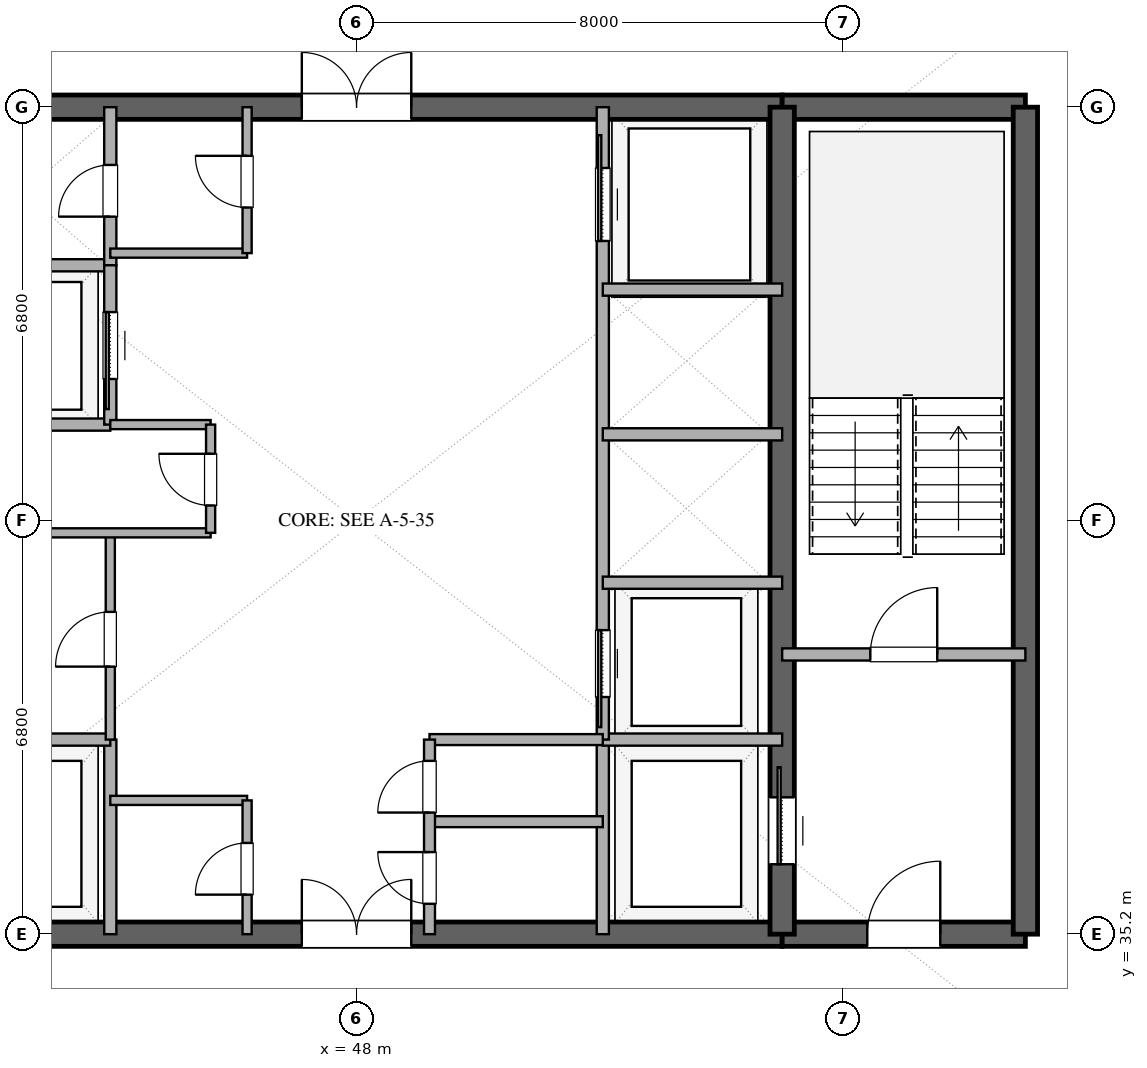
"""IFC4 building model, lengths in metres.
Left out: names, types, materials, properties, quantities, classifications, styles, units other than length and angle.
Written with IfcOpenShell. Run it as: python <this file> out.ifc"""

import sys

from ifc_helpers import new_model, si_unit, direction, frame, frame_2d, origin, place, context, subcontext, project, spatial, rectangle, extrude, element, fill, save


model = new_model("IFC4")
c1 = context("Model", 3, precision=1e-05, world=origin(), true_north=direction((0.0, 1.0)))
c2 = subcontext(c1, "Body", "Model", "MODEL_VIEW")
j1 = project(units=[si_unit("LENGTHUNIT", "METRE"), si_unit("PLANEANGLEUNIT", "RADIAN")], contexts=[c1])
p1 = place(None, origin())
s1 = spatial("IfcSite", under=j1, at=p1, CompositionType="ELEMENT")
p2 = place(p1, origin())
s2 = spatial("IfcBuilding", under=s1, at=p2, CompositionType="ELEMENT")
p3 = place(p2, frame((0.0, 0.0, 238.8)))
s3 = spatial("IfcBuildingStorey", under=s2, at=p3, CompositionType="ELEMENT", Elevation=238.8)
p4 = place(p3, frame((41.0, 35.2, 0.0), z_axis=(0.0, 0.0, 1.0), x_axis=(1.0, 0.0, 0.0)))
e1 = element("IfcWall", 1, at=p4, inside=s3, PredefinedType="SHEAR", context=c2, shape_type="SweptSolid", body=[
    extrude(rectangle(XDim=14.0, YDim=0.4, at=frame_2d((7.0, 0.0))), origin(), (0.0, 0.0, 1.0), 3.36),
])
p5 = place(p4, frame((6.1, 0.0, 0.0)))
e2 = element("IfcOpeningElement", 2, at=p5, cuts=e1, PredefinedType="OPENING", context=c2, shape_type="SweptSolid", body=[
    extrude(rectangle(XDim=1.8, YDim=2.25, at=frame_2d((0.9, 1.125))), frame((0.0, 0.21, 0.0), z_axis=(0.0, -1.0, 0.0), x_axis=(1.0, 0.0, 0.0)), (0.0, 0.0, 1.0), 0.42),
])
p6 = place(p3, frame((55.0, 35.2, 0.0), z_axis=(0.0, 0.0, 1.0), x_axis=(1.0, 0.0, 0.0)))
e3 = element("IfcWall", 3, at=p6, inside=s3, PredefinedType="SHEAR", context=c2, shape_type="SweptSolid", body=[
    extrude(rectangle(XDim=4.0, YDim=0.4, at=frame_2d((2.0, 0.0))), origin(), (0.0, 0.0, 1.0), 3.36),
])
p7 = place(p6, frame((1.4, 0.0, 0.0)))
e4 = element("IfcOpeningElement", 4, at=p7, cuts=e3, PredefinedType="OPENING", context=c2, shape_type="SweptSolid", body=[
    extrude(rectangle(XDim=1.2, YDim=2.15, at=frame_2d((0.6, 1.075))), frame((0.0, 0.21, 0.0), z_axis=(0.0, -1.0, 0.0), x_axis=(1.0, 0.0, 0.0)), (0.0, 0.0, 1.0), 0.42),
])
p8 = place(p3, frame((41.0, 48.8, 0.0), z_axis=(0.0, 0.0, 1.0), x_axis=(1.0, 0.0, 0.0)))
e5 = element("IfcWall", 5, at=p8, inside=s3, PredefinedType="SHEAR", context=c2, shape_type="SweptSolid", body=[
    extrude(rectangle(XDim=14.0, YDim=0.4, at=frame_2d((7.0, 0.0))), origin(), (0.0, 0.0, 1.0), 3.36),
])
p9 = place(p8, frame((6.1, 0.0, 0.0)))
e6 = element("IfcOpeningElement", 6, at=p9, cuts=e5, PredefinedType="OPENING", context=c2, shape_type="SweptSolid", body=[
    extrude(rectangle(XDim=1.8, YDim=2.25, at=frame_2d((0.9, 1.125))), frame((0.0, 0.21, 0.0), z_axis=(0.0, -1.0, 0.0), x_axis=(1.0, 0.0, 0.0)), (0.0, 0.0, 1.0), 0.42),
])
p10 = place(p3, frame((55.0, 48.8, 0.0), z_axis=(0.0, 0.0, 1.0), x_axis=(1.0, 0.0, 0.0)))
e7 = element("IfcWall", 7, at=p10, inside=s3, PredefinedType="SHEAR", context=c2, shape_type="SweptSolid", body=[
    extrude(rectangle(XDim=4.0, YDim=0.4, at=frame_2d((2.0, 0.0))), origin(), (0.0, 0.0, 1.0), 3.36),
])
p11 = place(p3, frame((59.0, 35.2, 0.0), z_axis=(0.0, 0.0, 1.0), x_axis=(0.0, 1.0, 0.0)))
e8 = element("IfcWall", 8, at=p11, inside=s3, PredefinedType="SHEAR", context=c2, shape_type="SweptSolid", body=[
    extrude(rectangle(XDim=13.6, YDim=0.4, at=frame_2d((6.8, 0.0))), origin(), (0.0, 0.0, 1.0), 3.36),
])
p12 = place(p3, frame((55.0, 35.2, 0.0), z_axis=(0.0, 0.0, 1.0), x_axis=(0.0, 1.0, 0.0)))
e9 = element("IfcWall", 9, at=p12, inside=s3, PredefinedType="SHEAR", context=c2, shape_type="SweptSolid", body=[
    extrude(rectangle(XDim=13.6, YDim=0.4, at=frame_2d((6.8, 0.0))), origin(), (0.0, 0.0, 1.0), 3.36),
])
p13 = place(p12, frame((1.15, 0.0, 0.0)))
e10 = element("IfcOpeningElement", 10, at=p13, cuts=e9, PredefinedType="OPENING", context=c2, shape_type="SweptSolid", body=[
    extrude(rectangle(XDim=1.1, YDim=2.2, at=frame_2d((0.55, 1.1))), frame((0.0, 0.21, 0.0), z_axis=(0.0, -1.0, 0.0), x_axis=(1.0, 0.0, 0.0)), (0.0, 0.0, 1.0), 0.42),
])
p14 = place(p3, frame((55.0, 39.8, 0.0), z_axis=(0.0, 0.0, 1.0), x_axis=(1.0, 0.0, 0.0)))
e11 = element("IfcWall", 11, at=p14, inside=s3, PredefinedType="SOLIDWALL", context=c2, shape_type="SweptSolid", body=[
    extrude(rectangle(XDim=4.0, YDim=0.2, at=frame_2d((2.0, 0.0))), origin(), (0.0, 0.0, 1.0), 2.72),
])
p15 = place(p14, frame((1.45, 0.0, 0.0)))
e12 = element("IfcOpeningElement", 12, at=p15, cuts=e11, PredefinedType="OPENING", context=c2, shape_type="SweptSolid", body=[
    extrude(rectangle(XDim=1.1, YDim=2.15, at=frame_2d((0.55, 1.075))), frame((0.0, 0.11, 0.0), z_axis=(0.0, -1.0, 0.0), x_axis=(1.0, 0.0, 0.0)), (0.0, 0.0, 1.0), 0.22),
])
p16 = place(p3, frame((43.95, 35.2, 0.0), z_axis=(0.0, 0.0, 1.0), x_axis=(0.0, 1.0, 0.0)))
e13 = element("IfcWall", 13, at=p16, inside=s3, PredefinedType="SOLIDWALL", context=c2, shape_type="SweptSolid", body=[
    extrude(rectangle(XDim=3.2, YDim=0.2, at=frame_2d((1.6, 0.0))), origin(), (0.0, 0.0, 1.0), 2.72),
])
p17 = place(p3, frame((41.0, 38.4, 0.0), z_axis=(0.0, 0.0, 1.0), x_axis=(1.0, 0.0, 0.0)))
e14 = element("IfcWall", 14, at=p17, inside=s3, PredefinedType="SOLIDWALL", context=c2, shape_type="SweptSolid", body=[
    extrude(rectangle(XDim=2.95, YDim=0.2, at=frame_2d((1.475, 0.0))), origin(), (0.0, 0.0, 1.0), 2.72),
])
p18 = place(p3, frame((52.05, 35.2, 0.0), z_axis=(0.0, 0.0, 1.0), x_axis=(0.0, 1.0, 0.0)))
e15 = element("IfcWall", 15, at=p18, inside=s3, PredefinedType="SOLIDWALL", context=c2, shape_type="SweptSolid", body=[
    extrude(rectangle(XDim=3.2, YDim=0.2, at=frame_2d((1.6, 0.0))), origin(), (0.0, 0.0, 1.0), 2.72),
])
for number, where, z_axis, x_axis in (
    (16, (52.05, 38.4, 0.0), (0.0, 0.0, 1.0), (1.0, 0.0, 0.0)),
    (17, (41.0, 46.2, 0.0), (0.0, 0.0, 1.0), (1.0, 0.0, 0.0)),
):
    element("IfcWall", number, at=place(p3, frame(where, z_axis=z_axis, x_axis=x_axis)), inside=s3, PredefinedType="SOLIDWALL", context=c2, shape_type="SweptSolid", body=[
        extrude(rectangle(XDim=2.95, YDim=0.2, at=frame_2d((1.475, 0.0))), origin(), (0.0, 0.0, 1.0), 2.72),
    ])
p19 = place(p3, frame((43.95, 46.2, 0.0), z_axis=(0.0, 0.0, 1.0), x_axis=(0.0, 1.0, 0.0)))
e18 = element("IfcWall", 18, at=p19, inside=s3, PredefinedType="SOLIDWALL", context=c2, shape_type="SweptSolid", body=[
    extrude(rectangle(XDim=2.6, YDim=0.2, at=frame_2d((1.3, 0.0))), origin(), (0.0, 0.0, 1.0), 2.72),
])
p20 = place(p19, frame((0.8, 0.0, 0.0)))
e19 = element("IfcOpeningElement", 19, at=p20, cuts=e18, PredefinedType="OPENING", context=c2, shape_type="SweptSolid", body=[
    extrude(rectangle(XDim=0.85, YDim=2.15, at=frame_2d((0.425, 1.075))), frame((0.0, 0.11, 0.0), z_axis=(0.0, -1.0, 0.0), x_axis=(1.0, 0.0, 0.0)), (0.0, 0.0, 1.0), 0.22),
])
p21 = place(p3, frame((41.0, 43.58, 0.0), z_axis=(0.0, 0.0, 1.0), x_axis=(1.0, 0.0, 0.0)))
e20 = element("IfcWall", 20, at=p21, inside=s3, PredefinedType="SOLIDWALL", context=c2, shape_type="SweptSolid", body=[
    extrude(rectangle(XDim=2.95, YDim=0.2, at=frame_2d((1.475, 0.0))), origin(), (0.0, 0.0, 1.0), 2.72),
])
p22 = place(p3, frame((43.95, 43.58, 0.0), z_axis=(0.0, 0.0, 1.0), x_axis=(0.0, 1.0, 0.0)))
e21 = element("IfcWall", 21, at=p22, inside=s3, PredefinedType="SOLIDWALL", context=c2, shape_type="SweptSolid", body=[
    extrude(rectangle(XDim=2.62, YDim=0.2, at=frame_2d((1.31, 0.0))), origin(), (0.0, 0.0, 1.0), 2.72),
])
p23 = place(p22, frame((0.75, 0.0, 0.0)))
e22 = element("IfcOpeningElement", 22, at=p23, cuts=e21, PredefinedType="OPENING", context=c2, shape_type="SweptSolid", body=[
    extrude(rectangle(XDim=1.1, YDim=2.2, at=frame_2d((0.55, 1.1))), frame((0.0, 0.11, 0.0), z_axis=(0.0, -1.0, 0.0), x_axis=(1.0, 0.0, 0.0)), (0.0, 0.0, 1.0), 0.22),
])
p24 = place(p3, frame((43.95, 38.4, 0.0), z_axis=(0.0, 0.0, 1.0), x_axis=(0.0, 1.0, 0.0)))
e23 = element("IfcWall", 23, at=p24, inside=s3, PredefinedType="PARTITIONING", context=c2, shape_type="SweptSolid", body=[
    extrude(rectangle(XDim=3.4, YDim=0.15, at=frame_2d((1.7, 0.0))), origin(), (0.0, 0.0, 1.0), 2.72),
])
p25 = place(p24, frame((1.2, 0.0, 0.0)))
e24 = element("IfcOpeningElement", 24, at=p25, cuts=e23, PredefinedType="OPENING", context=c2, shape_type="SweptSolid", body=[
    extrude(rectangle(XDim=0.9, YDim=2.15, at=frame_2d((0.45, 1.075))), frame((0.0, 0.085, 0.0), z_axis=(0.0, -1.0, 0.0), x_axis=(1.0, 0.0, 0.0)), (0.0, 0.0, 1.0), 0.17),
])
p26 = place(p3, frame((41.0, 41.8, 0.0), z_axis=(0.0, 0.0, 1.0), x_axis=(1.0, 0.0, 0.0)))
e25 = element("IfcWall", 25, at=p26, inside=s3, PredefinedType="PARTITIONING", context=c2, shape_type="SweptSolid", body=[
    extrude(rectangle(XDim=4.6, YDim=0.15, at=frame_2d((2.3, 0.0))), origin(), (0.0, 0.0, 1.0), 2.72),
])
p27 = place(p3, frame((43.95, 43.58, 0.0), z_axis=(0.0, 0.0, 1.0), x_axis=(1.0, 0.0, 0.0)))
e26 = element("IfcWall", 26, at=p27, inside=s3, PredefinedType="PARTITIONING", context=c2, shape_type="SweptSolid", body=[
    extrude(rectangle(XDim=1.65, YDim=0.15, at=frame_2d((0.825, 0.0))), origin(), (0.0, 0.0, 1.0), 2.72),
])
p28 = place(p3, frame((45.6, 41.8, 0.0), z_axis=(0.0, 0.0, 1.0), x_axis=(0.0, 1.0, 0.0)))
e27 = element("IfcWall", 27, at=p28, inside=s3, PredefinedType="PARTITIONING", context=c2, shape_type="SweptSolid", body=[
    extrude(rectangle(XDim=1.78, YDim=0.15, at=frame_2d((0.89, 0.0))), origin(), (0.0, 0.0, 1.0), 2.72),
])
p29 = place(p28, frame((0.45, 0.0, 0.0)))
e28 = element("IfcOpeningElement", 28, at=p29, cuts=e27, PredefinedType="OPENING", context=c2, shape_type="SweptSolid", body=[
    extrude(rectangle(XDim=0.85, YDim=2.15, at=frame_2d((0.425, 1.075))), frame((0.0, 0.085, 0.0), z_axis=(0.0, -1.0, 0.0), x_axis=(1.0, 0.0, 0.0)), (0.0, 0.0, 1.0), 0.17),
])
p30 = place(p3, frame((52.05, 38.4, 0.0), z_axis=(0.0, 0.0, 1.0), x_axis=(0.0, 1.0, 0.0)))
e29 = element("IfcWall", 29, at=p30, inside=s3, PredefinedType="SOLIDWALL", context=c2, shape_type="SweptSolid", body=[
    extrude(rectangle(XDim=10.4, YDim=0.2, at=frame_2d((5.2, 0.0))), origin(), (0.0, 0.0, 1.0), 2.72),
])
p31 = place(p30, frame((0.7, 0.0, 0.0)))
e30 = element("IfcOpeningElement", 30, at=p31, cuts=e29, PredefinedType="OPENING", context=c2, shape_type="SweptSolid", body=[
    extrude(rectangle(XDim=1.1, YDim=2.2, at=frame_2d((0.55, 1.1))), frame((0.0, 0.11, 0.0), z_axis=(0.0, -1.0, 0.0), x_axis=(1.0, 0.0, 0.0)), (0.0, 0.0, 1.0), 0.22),
])
p32 = place(p30, frame((8.2, 0.0, 0.0)))
e31 = element("IfcOpeningElement", 31, at=p32, cuts=e29, PredefinedType="OPENING", context=c2, shape_type="SweptSolid", body=[
    extrude(rectangle(XDim=1.2, YDim=2.2, at=frame_2d((0.6, 1.1))), frame((0.0, 0.11, 0.0), z_axis=(0.0, -1.0, 0.0), x_axis=(1.0, 0.0, 0.0)), (0.0, 0.0, 1.0), 0.22),
])
for number, where, z_axis, x_axis in (
    (32, (52.05, 40.98, 0.0), (0.0, 0.0, 1.0), (1.0, 0.0, 0.0)),
    (33, (52.05, 43.42, 0.0), (0.0, 0.0, 1.0), (1.0, 0.0, 0.0)),
    (34, (52.05, 45.8, 0.0), (0.0, 0.0, 1.0), (1.0, 0.0, 0.0)),
):
    element("IfcWall", number, at=place(p3, frame(where, z_axis=z_axis, x_axis=x_axis)), inside=s3, PredefinedType="SOLIDWALL", context=c2, shape_type="SweptSolid", body=[
        extrude(rectangle(XDim=2.95, YDim=0.2, at=frame_2d((1.475, 0.0))), origin(), (0.0, 0.0, 1.0), 2.72),
    ])
p33 = place(p3, frame((43.95, 37.4, 0.0), z_axis=(0.0, 0.0, 1.0), x_axis=(1.0, 0.0, 0.0)))
e35 = element("IfcWall", 35, at=p33, inside=s3, PredefinedType="PARTITIONING", context=c2, shape_type="SweptSolid", body=[
    extrude(rectangle(XDim=2.25, YDim=0.15, at=frame_2d((1.125, 0.0))), origin(), (0.0, 0.0, 1.0), 2.72),
])
p34 = place(p3, frame((46.2, 35.2, 0.0), z_axis=(0.0, 0.0, 1.0), x_axis=(0.0, 1.0, 0.0)))
e36 = element("IfcWall", 36, at=p34, inside=s3, PredefinedType="PARTITIONING", context=c2, shape_type="SweptSolid", body=[
    extrude(rectangle(XDim=2.2, YDim=0.15, at=frame_2d((1.1, 0.0))), origin(), (0.0, 0.0, 1.0), 2.72),
])
p35 = place(p34, frame((0.65, 0.0, 0.0)))
e37 = element("IfcOpeningElement", 37, at=p35, cuts=e36, PredefinedType="OPENING", context=c2, shape_type="SweptSolid", body=[
    extrude(rectangle(XDim=0.85, YDim=2.15, at=frame_2d((0.425, 1.075))), frame((0.0, 0.085, 0.0), z_axis=(0.0, -1.0, 0.0), x_axis=(1.0, 0.0, 0.0)), (0.0, 0.0, 1.0), 0.17),
])
p36 = place(p3, frame((43.95, 46.4, 0.0), z_axis=(0.0, 0.0, 1.0), x_axis=(1.0, 0.0, 0.0)))
e38 = element("IfcWall", 38, at=p36, inside=s3, PredefinedType="PARTITIONING", context=c2, shape_type="SweptSolid", body=[
    extrude(rectangle(XDim=2.25, YDim=0.15, at=frame_2d((1.125, 0.0))), origin(), (0.0, 0.0, 1.0), 2.72),
])
p37 = place(p3, frame((46.2, 46.4, 0.0), z_axis=(0.0, 0.0, 1.0), x_axis=(0.0, 1.0, 0.0)))
e39 = element("IfcWall", 39, at=p37, inside=s3, PredefinedType="PARTITIONING", context=c2, shape_type="SweptSolid", body=[
    extrude(rectangle(XDim=2.4, YDim=0.15, at=frame_2d((1.2, 0.0))), origin(), (0.0, 0.0, 1.0), 2.72),
])
p38 = place(p37, frame((0.75, 0.0, 0.0)))
e40 = element("IfcOpeningElement", 40, at=p38, cuts=e39, PredefinedType="OPENING", context=c2, shape_type="SweptSolid", body=[
    extrude(rectangle(XDim=0.85, YDim=2.15, at=frame_2d((0.425, 1.075))), frame((0.0, 0.085, 0.0), z_axis=(0.0, -1.0, 0.0), x_axis=(1.0, 0.0, 0.0)), (0.0, 0.0, 1.0), 0.17),
])
for number, where, z_axis, x_axis in (
    (41, (49.2, 37.05, 0.0), (0.0, 0.0, 1.0), (1.0, 0.0, 0.0)),
    (42, (49.2, 38.4, 0.0), (0.0, 0.0, 1.0), (1.0, 0.0, 0.0)),
):
    element("IfcWall", number, at=place(p3, frame(where, z_axis=z_axis, x_axis=x_axis)), inside=s3, PredefinedType="PLUMBINGWALL", context=c2, shape_type="SweptSolid", body=[
        extrude(rectangle(XDim=2.85, YDim=0.18, at=frame_2d((1.425, 0.0))), origin(), (0.0, 0.0, 1.0), 2.72),
    ])
p39 = place(p3, frame((49.2, 35.2, 0.0), z_axis=(0.0, 0.0, 1.0), x_axis=(0.0, 1.0, 0.0)))
e43 = element("IfcWall", 43, at=p39, inside=s3, PredefinedType="PLUMBINGWALL", context=c2, shape_type="SweptSolid", body=[
    extrude(rectangle(XDim=3.2, YDim=0.18, at=frame_2d((1.6, 0.0))), origin(), (0.0, 0.0, 1.0), 2.72),
])
p40 = place(p39, frame((0.5, 0.0, 0.0)))
e44 = element("IfcOpeningElement", 44, at=p40, cuts=e43, PredefinedType="OPENING", context=c2, shape_type="SweptSolid", body=[
    extrude(rectangle(XDim=0.85, YDim=2.1, at=frame_2d((0.425, 1.05))), frame((0.0, 0.1, 0.0), z_axis=(0.0, -1.0, 0.0), x_axis=(1.0, 0.0, 0.0)), (0.0, 0.0, 1.0), 0.2),
])
p41 = place(p39, frame((2.0, 0.0, 0.0)))
e45 = element("IfcOpeningElement", 45, at=p41, cuts=e43, PredefinedType="OPENING", context=c2, shape_type="SweptSolid", body=[
    extrude(rectangle(XDim=0.85, YDim=2.15, at=frame_2d((0.425, 1.075))), frame((0.0, 0.1, 0.0), z_axis=(0.0, -1.0, 0.0), x_axis=(1.0, 0.0, 0.0)), (0.0, 0.0, 1.0), 0.2),
])
p42 = place(p13, origin())
e46 = element("IfcDoor", 46, at=p42, inside=s3, OperationType="SLIDING_TO_RIGHT", PredefinedType="DOOR", context=c2, shape_type="SweptSolid", body=[
    extrude(rectangle(XDim=1.1, YDim=2.2, at=frame_2d((0.55, 1.1))), frame((0.0, 0.025, 0.0), z_axis=(0.0, -1.0, 0.0), x_axis=(1.0, 0.0, 0.0)), (0.0, 0.0, 1.0), 0.05),
])
fill(e10, e46)
p43 = place(p7, origin())
e47 = element("IfcDoor", 47, at=p43, inside=s3, OperationType="SINGLE_SWING_RIGHT", PredefinedType="DOOR", context=c2, shape_type="SweptSolid", body=[
    extrude(rectangle(XDim=1.2, YDim=2.15, at=frame_2d((0.6, 1.075))), frame((0.0, 0.025, 0.0), z_axis=(0.0, -1.0, 0.0), x_axis=(1.0, 0.0, 0.0)), (0.0, 0.0, 1.0), 0.05),
])
fill(e4, e47)
p44 = place(p5, origin())
e48 = element("IfcDoor", 48, at=p44, inside=s3, OperationType="DOUBLE_DOOR_SINGLE_SWING", PredefinedType="DOOR", context=c2, shape_type="SweptSolid", body=[
    extrude(rectangle(XDim=1.8, YDim=2.25, at=frame_2d((0.9, 1.125))), frame((0.0, 0.025, 0.0), z_axis=(0.0, -1.0, 0.0), x_axis=(1.0, 0.0, 0.0)), (0.0, 0.0, 1.0), 0.05),
])
fill(e2, e48)
p45 = place(p9, origin())
e49 = element("IfcDoor", 49, at=p45, inside=s3, OperationType="DOUBLE_DOOR_SINGLE_SWING", PredefinedType="DOOR", context=c2, shape_type="SweptSolid", body=[
    extrude(rectangle(XDim=1.8, YDim=2.25, at=frame_2d((0.9, 1.125))), frame((0.0, 0.025, 0.0), z_axis=(0.0, -1.0, 0.0), x_axis=(1.0, 0.0, 0.0)), (0.0, 0.0, 1.0), 0.05),
])
fill(e6, e49)
p46 = place(p15, origin())
e50 = element("IfcDoor", 50, at=p46, inside=s3, OperationType="SINGLE_SWING_RIGHT", PredefinedType="DOOR", context=c2, shape_type="SweptSolid", body=[
    extrude(rectangle(XDim=1.1, YDim=2.15, at=frame_2d((0.55, 1.075))), frame((0.0, 0.025, 0.0), z_axis=(0.0, -1.0, 0.0), x_axis=(1.0, 0.0, 0.0)), (0.0, 0.0, 1.0), 0.05),
])
fill(e12, e50)
p47 = place(p20, origin())
e51 = element("IfcDoor", 51, at=p47, inside=s3, OperationType="SINGLE_SWING_LEFT", PredefinedType="DOOR", context=c2, shape_type="SweptSolid", body=[
    extrude(rectangle(XDim=0.85, YDim=2.15, at=frame_2d((0.425, 1.075))), frame((0.0, 0.025, 0.0), z_axis=(0.0, -1.0, 0.0), x_axis=(1.0, 0.0, 0.0)), (0.0, 0.0, 1.0), 0.05),
])
fill(e19, e51)
p48 = place(p23, origin())
e52 = element("IfcDoor", 52, at=p48, inside=s3, OperationType="SLIDING_TO_LEFT", PredefinedType="DOOR", context=c2, shape_type="SweptSolid", body=[
    extrude(rectangle(XDim=1.1, YDim=2.2, at=frame_2d((0.55, 1.1))), frame((0.0, 0.025, 0.0), z_axis=(0.0, -1.0, 0.0), x_axis=(1.0, 0.0, 0.0)), (0.0, 0.0, 1.0), 0.05),
])
fill(e22, e52)
p49 = place(p25, origin())
e53 = element("IfcDoor", 53, at=p49, inside=s3, OperationType="SINGLE_SWING_LEFT", PredefinedType="DOOR", context=c2, shape_type="SweptSolid", body=[
    extrude(rectangle(XDim=0.9, YDim=2.15, at=frame_2d((0.45, 1.075))), frame((0.0, 0.025, 0.0), z_axis=(0.0, -1.0, 0.0), x_axis=(1.0, 0.0, 0.0)), (0.0, 0.0, 1.0), 0.05),
])
fill(e24, e53)
p50 = place(p29, origin())
e54 = element("IfcDoor", 54, at=p50, inside=s3, OperationType="SINGLE_SWING_RIGHT", PredefinedType="DOOR", context=c2, shape_type="SweptSolid", body=[
    extrude(rectangle(XDim=0.85, YDim=2.15, at=frame_2d((0.425, 1.075))), frame((0.0, 0.025, 0.0), z_axis=(0.0, -1.0, 0.0), x_axis=(1.0, 0.0, 0.0)), (0.0, 0.0, 1.0), 0.05),
])
fill(e28, e54)
p51 = place(p31, origin())
e55 = element("IfcDoor", 55, at=p51, inside=s3, OperationType="SLIDING_TO_LEFT", PredefinedType="DOOR", context=c2, shape_type="SweptSolid", body=[
    extrude(rectangle(XDim=1.1, YDim=2.2, at=frame_2d((0.55, 1.1))), frame((0.0, 0.025, 0.0), z_axis=(0.0, -1.0, 0.0), x_axis=(1.0, 0.0, 0.0)), (0.0, 0.0, 1.0), 0.05),
])
fill(e30, e55)
p52 = place(p32, origin())
e56 = element("IfcDoor", 56, at=p52, inside=s3, OperationType="SLIDING_TO_RIGHT", PredefinedType="DOOR", context=c2, shape_type="SweptSolid", body=[
    extrude(rectangle(XDim=1.2, YDim=2.2, at=frame_2d((0.6, 1.1))), frame((0.0, 0.025, 0.0), z_axis=(0.0, -1.0, 0.0), x_axis=(1.0, 0.0, 0.0)), (0.0, 0.0, 1.0), 0.05),
])
fill(e31, e56)
p53 = place(p35, origin())
e57 = element("IfcDoor", 57, at=p53, inside=s3, OperationType="SINGLE_SWING_LEFT", PredefinedType="DOOR", context=c2, shape_type="SweptSolid", body=[
    extrude(rectangle(XDim=0.85, YDim=2.15, at=frame_2d((0.425, 1.075))), frame((0.0, 0.025, 0.0), z_axis=(0.0, -1.0, 0.0), x_axis=(1.0, 0.0, 0.0)), (0.0, 0.0, 1.0), 0.05),
])
fill(e37, e57)
p54 = place(p38, origin())
e58 = element("IfcDoor", 58, at=p54, inside=s3, OperationType="SINGLE_SWING_RIGHT", PredefinedType="DOOR", context=c2, shape_type="SweptSolid", body=[
    extrude(rectangle(XDim=0.85, YDim=2.15, at=frame_2d((0.425, 1.075))), frame((0.0, 0.025, 0.0), z_axis=(0.0, -1.0, 0.0), x_axis=(1.0, 0.0, 0.0)), (0.0, 0.0, 1.0), 0.05),
])
fill(e40, e58)
p55 = place(p40, origin())
e59 = element("IfcDoor", 59, at=p55, inside=s3, OperationType="SINGLE_SWING_RIGHT", PredefinedType="DOOR", context=c2, shape_type="SweptSolid", body=[
    extrude(rectangle(XDim=0.85, YDim=2.1, at=frame_2d((0.425, 1.05))), frame((0.0, 0.025, 0.0), z_axis=(0.0, -1.0, 0.0), x_axis=(1.0, 0.0, 0.0)), (0.0, 0.0, 1.0), 0.05),
])
fill(e44, e59)
p56 = place(p41, origin())
e60 = element("IfcDoor", 60, at=p56, inside=s3, OperationType="SINGLE_SWING_LEFT", PredefinedType="DOOR", context=c2, shape_type="SweptSolid", body=[
    extrude(rectangle(XDim=0.85, YDim=2.15, at=frame_2d((0.425, 1.075))), frame((0.0, 0.025, 0.0), z_axis=(0.0, -1.0, 0.0), x_axis=(1.0, 0.0, 0.0)), (0.0, 0.0, 1.0), 0.05),
])
fill(e45, e60)
save(model, sys.argv[1])
